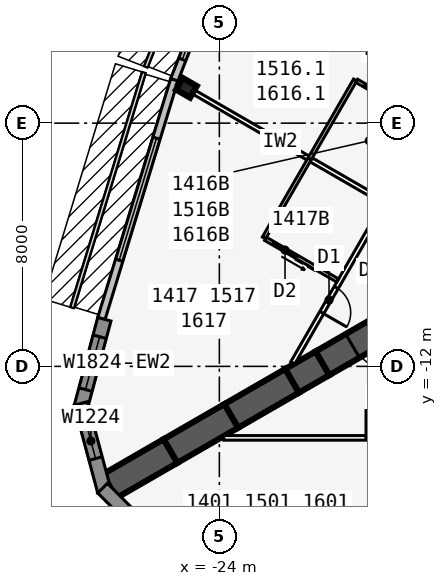
"""IFC4 building model, lengths in metres.
Left out: names, types, materials, properties, quantities, classifications, styles, units other than length and angle.
Written with IfcOpenShell. Run it as: python <this file> out.ifc"""

import sys

from ifc_helpers import new_model, si_unit, direction, frame, frame_2d, origin, origin_2d, place, context, subcontext, project, spatial, polyline, rectangle, i_section, outline, extrude, element, fill, save


model = new_model("IFC4")
c1 = context("Model", 3, precision=1e-05, world=origin(), true_north=direction((0.0, 1.0)))
c2 = subcontext(c1, "Body", "Model", "MODEL_VIEW")
j1 = project(units=[si_unit("LENGTHUNIT", "METRE"), si_unit("PLANEANGLEUNIT", "RADIAN")], contexts=[c1])
p1 = place(None, origin())
s1 = spatial("IfcSite", under=j1, at=p1, CompositionType="ELEMENT")
p2 = place(p1, origin())
s2 = spatial("IfcBuilding", under=s1, at=p2, CompositionType="ELEMENT")
p3 = place(p2, frame((0.0, 0.0, 59.1)))
s3 = spatial("IfcBuildingStorey", under=s2, at=p3, CompositionType="ELEMENT", Elevation=59.1)
p4 = place(p3, frame((-16.5, -9.526, 0.0), z_axis=(0.0, 0.0, 1.0), x_axis=(-0.866031398331, -0.499989616998, 0.0)))
e1 = element("IfcWall", 1, at=p4, inside=s3, PredefinedType="SHEAR", context=c2, shape_type="SweptSolid", body=[
    extrude(rectangle(XDim=4.746, YDim=0.9, at=frame_2d((2.373, 0.0))), origin(), (0.0, 0.0, 1.0), 3.4),
])
p5 = place(p4, frame((1.8, 0.0, 0.0)))
e2 = element("IfcOpeningElement", 2, at=p5, cuts=e1, PredefinedType="OPENING", context=c2, shape_type="SweptSolid", body=[
    extrude(rectangle(XDim=1.8, YDim=2.13, at=frame_2d((0.9, 1.065))), frame((0.0, 0.46, 0.0), z_axis=(0.0, -1.0, 0.0), x_axis=(1.0, 0.0, 0.0)), (0.0, 0.0, 1.0), 0.92),
])
p6 = place(p3, frame((-20.61, -11.899, 0.0), z_axis=(0.0, 0.0, 1.0), x_axis=(-0.866009537788, -0.500027479704, 0.0)))
e3 = element("IfcWall", 3, at=p6, inside=s3, PredefinedType="SHEAR", context=c2, shape_type="SweptSolid", body=[
    extrude(rectangle(XDim=1.155, YDim=0.9, at=frame_2d((0.577, 0.0))), origin(), (0.0, 0.0, 1.0), 3.4),
])
for number, where, z_axis, x_axis in (
    (4, (-21.61, -12.477, 0.0), (0.0, 0.0, 1.0), (-0.866, -0.5, 0.0)),
    (5, (-23.61, -13.631, 0.0), (0.0, 0.0, 1.0), (-0.866, -0.5, 0.0)),
    (6, (-25.61, -14.786, 0.0), (0.0, 0.0, 1.0), (-0.866, -0.5, 0.0)),
):
    element("IfcWall", number, at=place(p3, frame(where, z_axis=z_axis, x_axis=x_axis)), inside=s3, PredefinedType="SHEAR", context=c2, shape_type="SweptSolid", body=[
        extrude(rectangle(XDim=2.309, YDim=0.9, at=frame_2d((1.155, 0.0))), origin(), (0.0, 0.0, 1.0), 3.4),
    ])
p7 = place(p3, frame((-25.083, -2.839, 0.0), z_axis=(0.0, 0.0, 1.0), x_axis=(-0.5, -0.866025403784, 0.0)))
e7 = element("IfcColumn", 7, at=p7, inside=s3, PredefinedType="COLUMN", context=c2, shape_type="SweptSolid", body=[
    extrude(i_section(OverallWidth=0.442, OverallDepth=0.531, WebThickness=0.066, FlangeThickness=0.106, at=origin_2d()), origin(), (0.0, 0.0, 1.0), 3.4),
])
p8 = place(p3, frame((-23.645, 2.126, 0.0), z_axis=(0.0, 0.0, 1.0), x_axis=(-0.364013463868, -0.931393685894, 0.0)))
e8 = element("IfcWall", 8, at=p8, inside=s3, PredefinedType="STANDARD", context=c2, shape_type="SweptSolid", body=[
    extrude(rectangle(XDim=5.058, YDim=0.25, at=frame_2d((2.529, 0.0))), origin(), (0.0, 0.0, 1.0), 3.235),
])
p9 = place(p8, frame((0.729, 0.0, 0.45)))
e9 = element("IfcOpeningElement", 9, at=p9, cuts=e8, PredefinedType="OPENING", context=c2, shape_type="SweptSolid", body=[
    extrude(rectangle(XDim=3.6, YDim=2.4, at=frame_2d((1.8, 1.2))), frame((0.0, 0.135, 0.0), z_axis=(0.0, -1.0, 0.0), x_axis=(1.0, 0.0, 0.0)), (0.0, 0.0, 1.0), 0.27),
])
p10 = place(p3, frame((-25.483, -2.575, 0.0), z_axis=(0.0, 0.0, 1.0), x_axis=(-0.2919790669, -0.956424709265, 0.0)))
e10 = element("IfcWall", 10, at=p10, inside=s3, PredefinedType="STANDARD", context=c2, shape_type="SweptSolid", body=[
    extrude(rectangle(XDim=8.211, YDim=0.25, at=frame_2d((4.105, 0.0))), origin(), (0.0, 0.0, 1.0), 3.235),
])
p11 = place(p10, frame((2.006, 0.0, 0.45)))
e11 = element("IfcOpeningElement", 11, at=p11, cuts=e10, PredefinedType="OPENING", context=c2, shape_type="SweptSolid", body=[
    extrude(rectangle(XDim=4.2, YDim=2.4, at=frame_2d((2.1, 1.2))), frame((0.0, 0.135, 0.0), z_axis=(0.0, -1.0, 0.0), x_axis=(1.0, 0.0, 0.0)), (0.0, 0.0, 1.0), 0.27),
])
p12 = place(p3, frame((-27.783, -10.45, 0.0), z_axis=(0.0, 0.0, 1.0), x_axis=(-0.258780998834, -0.965936019953, 0.0)))
e12 = element("IfcWall", 12, at=p12, inside=s3, PredefinedType="SOLIDWALL", context=c2, shape_type="SweptSolid", body=[
    extrude(rectangle(XDim=2.989, YDim=0.45, at=frame_2d((1.494, 0.0))), origin(), (0.0, 0.0, 1.0), 3.235),
])
p13 = place(p12, frame((0.594, 0.0, 0.45)))
e13 = element("IfcOpeningElement", 13, at=p13, cuts=e12, PredefinedType="OPENING", context=c2, shape_type="SweptSolid", body=[
    extrude(rectangle(XDim=1.8, YDim=2.4, at=frame_2d((0.9, 1.2))), frame((0.0, 0.235, 0.0), z_axis=(0.0, -1.0, 0.0), x_axis=(1.0, 0.0, 0.0)), (0.0, 0.0, 1.0), 0.47),
])
p14 = place(p3, frame((-28.556, -13.221, 0.0), z_axis=(0.0, 0.0, 1.0), x_axis=(0.258801419081, -0.965930548995, 0.0)))
e14 = element("IfcWall", 14, at=p14, inside=s3, PredefinedType="SOLIDWALL", context=c2, shape_type="SweptSolid", body=[
    extrude(outline(polyline([(2.989, 0.225), (2.929, 0.225), (2.437, 0.093), (2.402, 0.225), (0.0, 0.225), (0.0, -0.225), (2.989, -0.225), (2.989, 0.225)])), origin(), (0.0, 0.0, 1.0), 3.235),
])
p15 = place(p14, frame((0.676, 0.0, 0.45)))
e15 = element("IfcOpeningElement", 15, at=p15, cuts=e14, PredefinedType="OPENING", context=c2, shape_type="SweptSolid", body=[
    extrude(rectangle(XDim=1.2, YDim=2.4, at=frame_2d((0.6, 1.2))), frame((0.0, 0.235, 0.0), z_axis=(0.0, -1.0, 0.0), x_axis=(1.0, 0.0, 0.0)), (0.0, 0.0, 1.0), 0.47),
])
p16 = place(p3, frame((-27.841, -16.007, 0.0), z_axis=(0.0, 0.0, 1.0), x_axis=(0.707025086683, -0.707188466253, 0.0)))
e16 = element("IfcWall", 16, at=p16, inside=s3, PredefinedType="SOLIDWALL", context=c2, shape_type="SweptSolid", body=[
    extrude(outline(polyline([(2.989, 0.225), (0.586, 0.225), (0.551, 0.093), (0.059, 0.225), (0.0, 0.225), (0.0, -0.225), (2.989, -0.225), (2.989, 0.225)])), origin(), (0.0, 0.0, 1.0), 3.235),
])
p17 = place(p16, frame((1.113, 0.0, 0.45)))
e17 = element("IfcOpeningElement", 17, at=p17, cuts=e16, PredefinedType="OPENING", context=c2, shape_type="SweptSolid", body=[
    extrude(rectangle(XDim=1.2, YDim=2.4, at=frame_2d((0.6, 1.2))), frame((0.0, 0.235, 0.0), z_axis=(0.0, -1.0, 0.0), x_axis=(1.0, 0.0, 0.0)), (0.0, 0.0, 1.0), 0.47),
])
p18 = place(p3, frame((-23.857, -14.351, 0.0), z_axis=(0.0, 0.0, 1.0), x_axis=(1.0, 0.0, 0.0)))
e18 = element("IfcWall", 18, at=p18, inside=s3, PredefinedType="PARTITIONING", context=c2, shape_type="SweptSolid", body=[
    extrude(rectangle(XDim=47.714, YDim=0.15, at=frame_2d((23.857, 0.0))), origin(), (0.0, 0.0, 1.0), 3.235),
])
p19 = place(p18, frame((4.682, 0.0, 0.0)))
e19 = element("IfcOpeningElement", 19, at=p19, cuts=e18, PredefinedType="OPENING", context=c2, shape_type="SweptSolid", body=[
    extrude(rectangle(XDim=0.95, YDim=2.13, at=frame_2d((0.475, 1.065))), frame((0.0, 0.085, 0.0), z_axis=(0.0, -1.0, 0.0), x_axis=(1.0, 0.0, 0.0)), (0.0, 0.0, 1.0), 0.17),
])
p20 = place(p18, frame((10.282, 0.0, 0.0)))
e20 = element("IfcOpeningElement", 20, at=p20, cuts=e18, PredefinedType="OPENING", context=c2, shape_type="SweptSolid", body=[
    extrude(rectangle(XDim=0.95, YDim=2.13, at=frame_2d((0.475, 1.065))), frame((0.0, 0.085, 0.0), z_axis=(0.0, -1.0, 0.0), x_axis=(1.0, 0.0, 0.0)), (0.0, 0.0, 1.0), 0.17),
])
p21 = place(p18, frame((16.482, 0.0, 0.0)))
e21 = element("IfcOpeningElement", 21, at=p21, cuts=e18, PredefinedType="OPENING", context=c2, shape_type="SweptSolid", body=[
    extrude(rectangle(XDim=0.95, YDim=2.13, at=frame_2d((0.475, 1.065))), frame((0.0, 0.085, 0.0), z_axis=(0.0, -1.0, 0.0), x_axis=(1.0, 0.0, 0.0)), (0.0, 0.0, 1.0), 0.17),
])
p22 = place(p18, frame((21.482, 0.0, 0.0)))
e22 = element("IfcOpeningElement", 22, at=p22, cuts=e18, PredefinedType="OPENING", context=c2, shape_type="SweptSolid", body=[
    extrude(rectangle(XDim=0.95, YDim=2.13, at=frame_2d((0.475, 1.065))), frame((0.0, 0.085, 0.0), z_axis=(0.0, -1.0, 0.0), x_axis=(1.0, 0.0, 0.0)), (0.0, 0.0, 1.0), 0.17),
])
p23 = place(p18, frame((25.857, 0.0, 0.0)))
e23 = element("IfcOpeningElement", 23, at=p23, cuts=e18, PredefinedType="OPENING", context=c2, shape_type="SweptSolid", body=[
    extrude(rectangle(XDim=1.0, YDim=2.13, at=frame_2d((0.5, 1.065))), frame((0.0, 0.085, 0.0), z_axis=(0.0, -1.0, 0.0), x_axis=(1.0, 0.0, 0.0)), (0.0, 0.0, 1.0), 0.17),
])
p24 = place(p18, frame((30.882, 0.0, 0.0)))
e24 = element("IfcOpeningElement", 24, at=p24, cuts=e18, PredefinedType="OPENING", context=c2, shape_type="SweptSolid", body=[
    extrude(rectangle(XDim=0.95, YDim=2.13, at=frame_2d((0.475, 1.065))), frame((0.0, 0.085, 0.0), z_axis=(0.0, -1.0, 0.0), x_axis=(1.0, 0.0, 0.0)), (0.0, 0.0, 1.0), 0.17),
])
p25 = place(p18, frame((42.082, 0.0, 0.0)))
e25 = element("IfcOpeningElement", 25, at=p25, cuts=e18, PredefinedType="OPENING", context=c2, shape_type="SweptSolid", body=[
    extrude(rectangle(XDim=0.95, YDim=2.13, at=frame_2d((0.475, 1.065))), frame((0.0, 0.085, 0.0), z_axis=(0.0, -1.0, 0.0), x_axis=(1.0, 0.0, 0.0)), (0.0, 0.0, 1.0), 0.17),
])
p26 = place(p3, frame((-0.5, 24.636, 0.0), z_axis=(0.0, 0.0, 1.0), x_axis=(-0.500001915564, -0.86602429783, 0.0)))
e26 = element("IfcWall", 26, at=p26, inside=s3, PredefinedType="PARTITIONING", context=c2, shape_type="SweptSolid", body=[
    extrude(rectangle(XDim=42.172, YDim=0.15, at=frame_2d((21.086, 0.0))), origin(), (0.0, 0.0, 1.0), 3.235),
])
p27 = place(p26, frame((2.338, 0.0, 0.0)))
e27 = element("IfcOpeningElement", 27, at=p27, cuts=e26, PredefinedType="OPENING", context=c2, shape_type="SweptSolid", body=[
    extrude(rectangle(XDim=0.95, YDim=2.13, at=frame_2d((0.475, 1.065))), frame((0.0, 0.085, 0.0), z_axis=(0.0, -1.0, 0.0), x_axis=(1.0, 0.0, 0.0)), (0.0, 0.0, 1.0), 0.17),
])
p28 = place(p26, frame((12.511, 0.0, 0.0)))
e28 = element("IfcOpeningElement", 28, at=p28, cuts=e26, PredefinedType="OPENING", context=c2, shape_type="SweptSolid", body=[
    extrude(rectangle(XDim=0.95, YDim=2.13, at=frame_2d((0.475, 1.065))), frame((0.0, 0.085, 0.0), z_axis=(0.0, -1.0, 0.0), x_axis=(1.0, 0.0, 0.0)), (0.0, 0.0, 1.0), 0.17),
])
p29 = place(p26, frame((19.311, 0.0, 0.0)))
e29 = element("IfcOpeningElement", 29, at=p29, cuts=e26, PredefinedType="OPENING", context=c2, shape_type="SweptSolid", body=[
    extrude(rectangle(XDim=0.95, YDim=2.13, at=frame_2d((0.475, 1.065))), frame((0.0, 0.085, 0.0), z_axis=(0.0, -1.0, 0.0), x_axis=(1.0, 0.0, 0.0)), (0.0, 0.0, 1.0), 0.17),
])
p30 = place(p26, frame((28.111, 0.0, 0.0)))
e30 = element("IfcOpeningElement", 30, at=p30, cuts=e26, PredefinedType="OPENING", context=c2, shape_type="SweptSolid", body=[
    extrude(rectangle(XDim=0.95, YDim=2.13, at=frame_2d((0.475, 1.065))), frame((0.0, 0.085, 0.0), z_axis=(0.0, -1.0, 0.0), x_axis=(1.0, 0.0, 0.0)), (0.0, 0.0, 1.0), 0.17),
])
p31 = place(p26, frame((39.311, 0.0, 0.0)))
e31 = element("IfcOpeningElement", 31, at=p31, cuts=e26, PredefinedType="OPENING", context=c2, shape_type="SweptSolid", body=[
    extrude(rectangle(XDim=0.95, YDim=2.13, at=frame_2d((0.475, 1.065))), frame((0.0, 0.085, 0.0), z_axis=(0.0, -1.0, 0.0), x_axis=(1.0, 0.0, 0.0)), (0.0, 0.0, 1.0), 0.17),
])
p32 = place(p3, frame((-16.108, -2.247, 0.0), z_axis=(0.0, 0.0, 1.0), x_axis=(-0.866018881988, 0.500011295912, 0.0)))
e32 = element("IfcWall", 32, at=p32, inside=s3, PredefinedType="PARTITIONING", context=c2, shape_type="SweptSolid", body=[
    extrude(rectangle(XDim=8.585, YDim=0.1, at=frame_2d((4.292, 0.0))), origin(), (0.0, 0.0, 1.0), 2.389),
])
p33 = place(p32, frame((0.45, 0.0, 0.0)))
e33 = element("IfcOpeningElement", 33, at=p33, cuts=e32, PredefinedType="OPENING", context=c2, shape_type="SweptSolid", body=[
    extrude(rectangle(XDim=0.9, YDim=2.13, at=frame_2d((0.45, 1.065))), frame((0.0, 0.06, 0.0), z_axis=(0.0, -1.0, 0.0), x_axis=(1.0, 0.0, 0.0)), (0.0, 0.0, 1.0), 0.12),
])
p34 = place(p3, frame((-18.608, -6.577, 0.0), z_axis=(0.0, 0.0, 1.0), x_axis=(-0.866034818847, 0.499983692279, 0.0)))
e34 = element("IfcWall", 34, at=p34, inside=s3, PredefinedType="PARTITIONING", context=c2, shape_type="SweptSolid", body=[
    extrude(rectangle(XDim=7.82, YDim=0.15, at=frame_2d((3.91, 0.0))), origin(), (0.0, 0.0, 1.0), 2.389),
])
p35 = place(p3, frame((-19.533, -2.579, 0.0), z_axis=(0.0, 0.0, 1.0), x_axis=(-0.499990139034, -0.866031096941, 0.0)))
e35 = element("IfcWall", 35, at=p35, inside=s3, PredefinedType="PLUMBINGWALL", context=c2, shape_type="SweptSolid", body=[
    extrude(rectangle(XDim=3.0, YDim=0.12, at=frame_2d((1.5, 0.0))), origin(), (0.0, 0.0, 1.0), 3.235),
])
p36 = place(p3, frame((-17.108, -3.979, 0.0), z_axis=(0.0, 0.0, 1.0), x_axis=(-0.865997131366, 0.500048966069, 0.0)))
e36 = element("IfcWall", 36, at=p36, inside=s3, PredefinedType="PLUMBINGWALL", context=c2, shape_type="SweptSolid", body=[
    extrude(rectangle(XDim=2.74, YDim=0.12, at=frame_2d((1.37, 0.0))), origin(), (0.0, 0.0, 1.0), 3.235),
])
p37 = place(p36, frame((1.55, 0.0, 0.0)))
e37 = element("IfcOpeningElement", 37, at=p37, cuts=e36, PredefinedType="OPENING", context=c2, shape_type="SweptSolid", body=[
    extrude(rectangle(XDim=0.9, YDim=2.13, at=frame_2d((0.45, 1.065))), frame((0.0, 0.07, 0.0), z_axis=(0.0, -1.0, 0.0), x_axis=(1.0, 0.0, 0.0)), (0.0, 0.0, 1.0), 0.14),
])
p38 = place(p3, frame((-21.033, -5.177, 0.0), z_axis=(0.0, 0.0, 1.0), x_axis=(-0.499990139034, -0.866031096941, 0.0)))
e38 = element("IfcWall", 38, at=p38, inside=s3, PredefinedType="PLUMBINGWALL", context=c2, shape_type="SweptSolid", body=[
    extrude(rectangle(XDim=3.0, YDim=0.12, at=frame_2d((1.5, 0.0))), origin(), (0.0, 0.0, 1.0), 3.235),
])
p39 = place(p3, frame((-20.108, -9.175, 0.0), z_axis=(0.0, 0.0, 1.0), x_axis=(-0.866035715982, 0.499982138324, 0.0)))
e39 = element("IfcWall", 39, at=p39, inside=s3, PredefinedType="PLUMBINGWALL", context=c2, shape_type="SweptSolid", body=[
    extrude(rectangle(XDim=2.74, YDim=0.12, at=frame_2d((1.37, 0.0))), origin(), (0.0, 0.0, 1.0), 3.235),
])
p40 = place(p39, frame((1.55, 0.0, 0.0)))
e40 = element("IfcOpeningElement", 40, at=p40, cuts=e39, PredefinedType="OPENING", context=c2, shape_type="SweptSolid", body=[
    extrude(rectangle(XDim=0.9, YDim=2.13, at=frame_2d((0.45, 1.065))), frame((0.0, 0.07, 0.0), z_axis=(0.0, -1.0, 0.0), x_axis=(1.0, 0.0, 0.0)), (0.0, 0.0, 1.0), 0.14),
])
p41 = place(p9, origin())
e41 = element("IfcWindow", 41, at=p41, inside=s3, PartitioningType="SINGLE_PANEL", PredefinedType="WINDOW", context=c2, shape_type="SweptSolid", body=[
    extrude(rectangle(XDim=3.6, YDim=2.4, at=frame_2d((1.8, 1.2))), frame((0.0, 0.03, 0.0), z_axis=(0.0, -1.0, 0.0), x_axis=(1.0, 0.0, 0.0)), (0.0, 0.0, 1.0), 0.06),
])
fill(e9, e41)
p42 = place(p11, origin())
e42 = element("IfcWindow", 42, at=p42, inside=s3, PartitioningType="SINGLE_PANEL", PredefinedType="WINDOW", context=c2, shape_type="SweptSolid", body=[
    extrude(rectangle(XDim=4.2, YDim=2.4, at=frame_2d((2.1, 1.2))), frame((0.0, 0.03, 0.0), z_axis=(0.0, -1.0, 0.0), x_axis=(1.0, 0.0, 0.0)), (0.0, 0.0, 1.0), 0.06),
])
fill(e11, e42)
p43 = place(p13, origin())
e43 = element("IfcWindow", 43, at=p43, inside=s3, PartitioningType="SINGLE_PANEL", PredefinedType="WINDOW", context=c2, shape_type="SweptSolid", body=[
    extrude(rectangle(XDim=1.8, YDim=2.4, at=frame_2d((0.9, 1.2))), frame((0.0, 0.03, 0.0), z_axis=(0.0, -1.0, 0.0), x_axis=(1.0, 0.0, 0.0)), (0.0, 0.0, 1.0), 0.06),
])
fill(e13, e43)
p44 = place(p15, origin())
e44 = element("IfcWindow", 44, at=p44, inside=s3, PartitioningType="SINGLE_PANEL", PredefinedType="WINDOW", context=c2, shape_type="SweptSolid", body=[
    extrude(rectangle(XDim=1.2, YDim=2.4, at=frame_2d((0.6, 1.2))), frame((0.0, 0.03, 0.0), z_axis=(0.0, -1.0, 0.0), x_axis=(1.0, 0.0, 0.0)), (0.0, 0.0, 1.0), 0.06),
])
fill(e15, e44)
p45 = place(p19, origin())
e45 = element("IfcDoor", 45, at=p45, inside=s3, OperationType="SINGLE_SWING_LEFT", PredefinedType="DOOR", context=c2, shape_type="SweptSolid", body=[
    extrude(rectangle(XDim=0.95, YDim=2.13, at=frame_2d((0.475, 1.065))), frame((0.0, 0.025, 0.0), z_axis=(0.0, -1.0, 0.0), x_axis=(1.0, 0.0, 0.0)), (0.0, 0.0, 1.0), 0.05),
])
fill(e19, e45)
p46 = place(p37, origin())
e46 = element("IfcDoor", 46, at=p46, inside=s3, OperationType="SLIDING_TO_LEFT", PredefinedType="DOOR", context=c2, shape_type="SweptSolid", body=[
    extrude(rectangle(XDim=0.9, YDim=2.13, at=frame_2d((0.45, 1.065))), frame((0.0, 0.025, 0.0), z_axis=(0.0, -1.0, 0.0), x_axis=(1.0, 0.0, 0.0)), (0.0, 0.0, 1.0), 0.05),
])
fill(e37, e46)
p47 = place(p40, origin())
e47 = element("IfcDoor", 47, at=p47, inside=s3, OperationType="SLIDING_TO_LEFT", PredefinedType="DOOR", context=c2, shape_type="SweptSolid", body=[
    extrude(rectangle(XDim=0.9, YDim=2.13, at=frame_2d((0.45, 1.065))), frame((0.0, 0.025, 0.0), z_axis=(0.0, -1.0, 0.0), x_axis=(1.0, 0.0, 0.0)), (0.0, 0.0, 1.0), 0.05),
])
fill(e40, e47)
p48 = place(p31, origin())
e48 = element("IfcDoor", 48, at=p48, inside=s3, OperationType="SINGLE_SWING_RIGHT", PredefinedType="DOOR", context=c2, shape_type="SweptSolid", body=[
    extrude(rectangle(XDim=0.95, YDim=2.13, at=frame_2d((0.475, 1.065))), frame((0.0, 0.025, 0.0), z_axis=(0.0, -1.0, 0.0), x_axis=(1.0, 0.0, 0.0)), (0.0, 0.0, 1.0), 0.05),
])
fill(e31, e48)
p49 = place(p5, origin())
e49 = element("IfcDoor", 49, at=p49, inside=s3, OperationType="DOUBLE_DOOR_DOUBLE_SWING", PredefinedType="DOOR", context=c2, shape_type="SweptSolid", body=[
    extrude(rectangle(XDim=1.8, YDim=2.13, at=frame_2d((0.9, 1.065))), frame((0.0, 0.025, 0.0), z_axis=(0.0, -1.0, 0.0), x_axis=(1.0, 0.0, 0.0)), (0.0, 0.0, 1.0), 0.05),
])
fill(e2, e49)
save(model, sys.argv[1])
